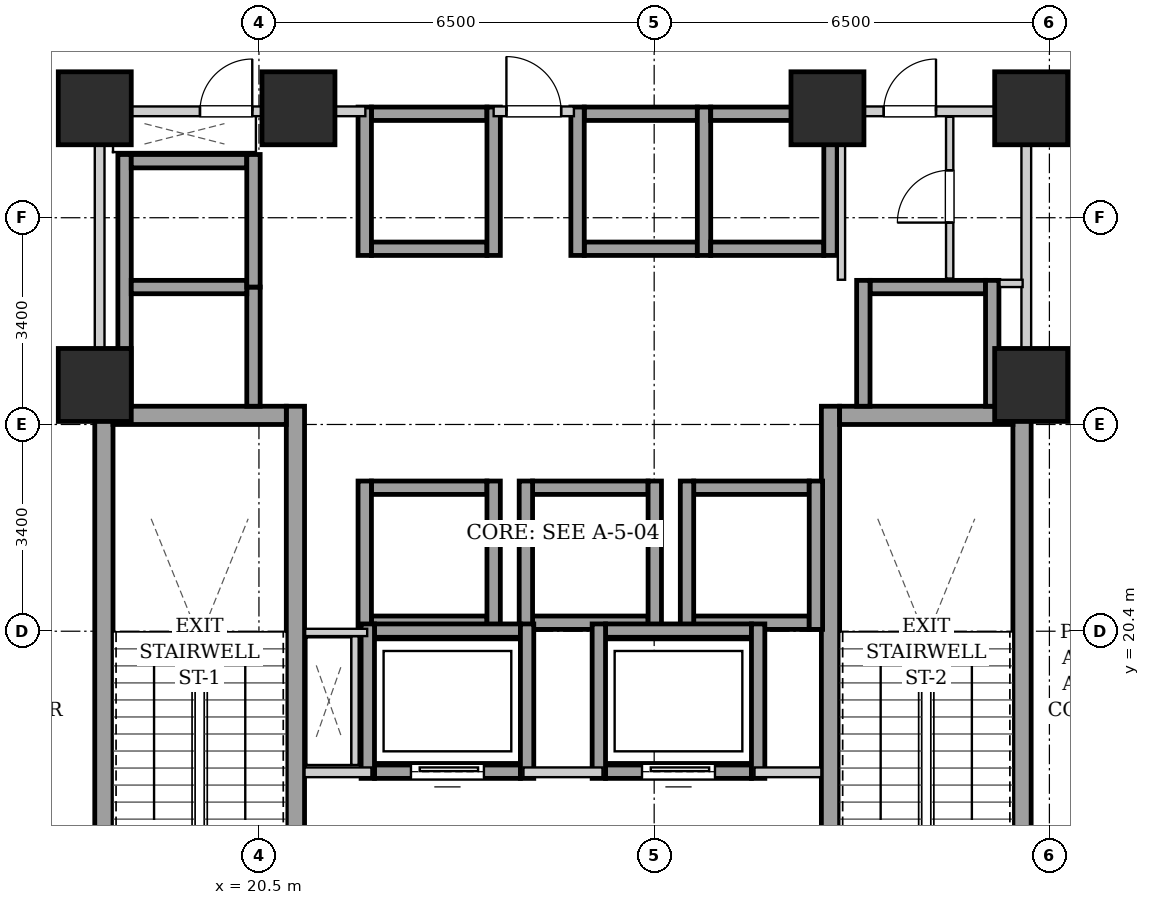
"""IFC4 building model, lengths in metres.
Left out: names, types, materials, properties, quantities, classifications, styles, units other than length and angle.
Written with IfcOpenShell. Run it as: python <this file> out.ifc"""

import sys

from ifc_helpers import new_model, si_unit, direction, frame, frame_2d, origin, origin_2d, place, context, subcontext, project, spatial, rectangle, extrude, element, fill, save


model = new_model("IFC4")
c1 = context("Model", 3, precision=1e-05, world=origin(), true_north=direction((0.0, 1.0)))
c2 = subcontext(c1, "Body", "Model", "MODEL_VIEW")
j1 = project(units=[si_unit("LENGTHUNIT", "METRE"), si_unit("PLANEANGLEUNIT", "RADIAN")], contexts=[c1])
p1 = place(None, origin())
s1 = spatial("IfcSite", under=j1, at=p1, CompositionType="ELEMENT")
p2 = place(p1, origin())
s2 = spatial("IfcBuilding", under=s1, at=p2, CompositionType="ELEMENT")
p3 = place(p2, frame((0.0, 0.0, 11.2)))
s3 = spatial("IfcBuildingStorey", under=s2, at=p3, CompositionType="ELEMENT", Elevation=11.2)
for number, where, z_axis, x_axis in (
    (1, (17.8, 29.0, 0.0), (0.0, 0.0, 1.0), (1.0, 0.0, 0.0)),
    (2, (21.15, 29.0, 0.0), (0.0, 0.0, 1.0), (1.0, 0.0, 0.0)),
    (3, (29.85, 29.0, 0.0), (0.0, 0.0, 1.0), (1.0, 0.0, 0.0)),
    (4, (33.2, 29.0, 0.0), (0.0, 0.0, 1.0), (1.0, 0.0, 0.0)),
    (5, (17.8, 24.45, 0.0), (0.0, 0.0, 1.0), (1.0, 0.0, 0.0)),
    (6, (33.2, 24.45, 0.0), (0.0, 0.0, 1.0), (1.0, 0.0, 0.0)),
):
    element("IfcColumn", number, at=place(p3, frame(where, z_axis=z_axis, x_axis=x_axis)), inside=s3, PredefinedType="COLUMN", context=c2, shape_type="SweptSolid", body=[
        extrude(rectangle(XDim=1.2, YDim=1.2, at=origin_2d()), origin(), (0.0, 0.0, 1.0), 4.8),
    ])
for number, where, z_axis, x_axis in (
    (7, (17.95, 15.1, 0.0), (0.0, 0.0, 1.0), (0.0, 1.0, 0.0)),
    (8, (21.1, 15.1, 0.0), (0.0, 0.0, 1.0), (0.0, 1.0, 0.0)),
):
    element("IfcWall", number, at=place(p3, frame(where, z_axis=z_axis, x_axis=x_axis)), inside=s3, PredefinedType="SHEAR", context=c2, shape_type="SweptSolid", body=[
        extrude(rectangle(XDim=9.0, YDim=0.3, at=frame_2d((4.5, 0.0))), origin(), (0.0, 0.0, 1.0), 4.48),
    ])
p4 = place(p3, frame((18.1, 23.95, 0.0), z_axis=(0.0, 0.0, 1.0), x_axis=(1.0, 0.0, 0.0)))
e9 = element("IfcWall", 9, at=p4, inside=s3, PredefinedType="SHEAR", context=c2, shape_type="SweptSolid", body=[
    extrude(rectangle(XDim=2.85, YDim=0.3, at=frame_2d((1.425, 0.0))), origin(), (0.0, 0.0, 1.0), 4.48),
])
for number, where, z_axis, x_axis in (
    (10, (29.9, 15.1, 0.0), (0.0, 0.0, 1.0), (0.0, 1.0, 0.0)),
    (11, (33.05, 15.1, 0.0), (0.0, 0.0, 1.0), (0.0, 1.0, 0.0)),
):
    element("IfcWall", number, at=place(p3, frame(where, z_axis=z_axis, x_axis=x_axis)), inside=s3, PredefinedType="SHEAR", context=c2, shape_type="SweptSolid", body=[
        extrude(rectangle(XDim=9.0, YDim=0.3, at=frame_2d((4.5, 0.0))), origin(), (0.0, 0.0, 1.0), 4.48),
    ])
p5 = place(p3, frame((30.05, 23.95, 0.0), z_axis=(0.0, 0.0, 1.0), x_axis=(1.0, 0.0, 0.0)))
e12 = element("IfcWall", 12, at=p5, inside=s3, PredefinedType="SHEAR", context=c2, shape_type="SweptSolid", body=[
    extrude(rectangle(XDim=2.85, YDim=0.3, at=frame_2d((1.425, 0.0))), origin(), (0.0, 0.0, 1.0), 4.48),
])
for number, where, z_axis, x_axis in (
    (13, (22.35, 26.69, 0.0), (0.0, 0.0, 1.0), (1.0, 0.0, 0.0)),
    (14, (22.35, 28.91, 0.0), (0.0, 0.0, 1.0), (1.0, 0.0, 0.0)),
):
    element("IfcWall", number, at=place(p3, frame(where, z_axis=z_axis, x_axis=x_axis)), inside=s3, PredefinedType="SHEAR", context=c2, shape_type="SweptSolid", body=[
        extrude(rectangle(XDim=1.9, YDim=0.22, at=frame_2d((0.95, 0.0))), origin(), (0.0, 0.0, 1.0), 4.48),
    ])
for number, where, z_axis, x_axis in (
    (15, (22.24, 26.58, 0.0), (0.0, 0.0, 1.0), (0.0, 1.0, 0.0)),
    (16, (24.36, 26.58, 0.0), (0.0, 0.0, 1.0), (0.0, 1.0, 0.0)),
):
    element("IfcWall", number, at=place(p3, frame(where, z_axis=z_axis, x_axis=x_axis)), inside=s3, PredefinedType="SHEAR", context=c2, shape_type="SweptSolid", body=[
        extrude(rectangle(XDim=2.44, YDim=0.22, at=frame_2d((1.22, 0.0))), origin(), (0.0, 0.0, 1.0), 4.48),
    ])
for number, where, z_axis, x_axis in (
    (17, (25.85, 26.69, 0.0), (0.0, 0.0, 1.0), (1.0, 0.0, 0.0)),
    (18, (25.85, 28.91, 0.0), (0.0, 0.0, 1.0), (1.0, 0.0, 0.0)),
):
    element("IfcWall", number, at=place(p3, frame(where, z_axis=z_axis, x_axis=x_axis)), inside=s3, PredefinedType="SHEAR", context=c2, shape_type="SweptSolid", body=[
        extrude(rectangle(XDim=1.86, YDim=0.22, at=frame_2d((0.93, 0.0))), origin(), (0.0, 0.0, 1.0), 4.48),
    ])
for number, where, z_axis, x_axis in (
    (19, (25.74, 26.58, 0.0), (0.0, 0.0, 1.0), (0.0, 1.0, 0.0)),
    (20, (27.82, 26.58, 0.0), (0.0, 0.0, 1.0), (0.0, 1.0, 0.0)),
):
    element("IfcWall", number, at=place(p3, frame(where, z_axis=z_axis, x_axis=x_axis)), inside=s3, PredefinedType="SHEAR", context=c2, shape_type="SweptSolid", body=[
        extrude(rectangle(XDim=2.44, YDim=0.22, at=frame_2d((1.22, 0.0))), origin(), (0.0, 0.0, 1.0), 4.48),
    ])
for number, where, z_axis, x_axis in (
    (21, (27.93, 26.69, 0.0), (0.0, 0.0, 1.0), (1.0, 0.0, 0.0)),
    (22, (27.93, 28.91, 0.0), (0.0, 0.0, 1.0), (1.0, 0.0, 0.0)),
):
    element("IfcWall", number, at=place(p3, frame(where, z_axis=z_axis, x_axis=x_axis)), inside=s3, PredefinedType="SHEAR", context=c2, shape_type="SweptSolid", body=[
        extrude(rectangle(XDim=1.86, YDim=0.22, at=frame_2d((0.93, 0.0))), origin(), (0.0, 0.0, 1.0), 4.48),
    ])
p6 = place(p3, frame((29.9, 26.58, 0.0), z_axis=(0.0, 0.0, 1.0), x_axis=(0.0, 1.0, 0.0)))
e23 = element("IfcWall", 23, at=p6, inside=s3, PredefinedType="SHEAR", context=c2, shape_type="SweptSolid", body=[
    extrude(rectangle(XDim=2.44, YDim=0.22, at=frame_2d((1.22, 0.0))), origin(), (0.0, 0.0, 1.0), 4.48),
])
for number, where, z_axis, x_axis in (
    (24, (22.35, 20.54, 0.0), (0.0, 0.0, 1.0), (1.0, 0.0, 0.0)),
    (25, (22.35, 22.76, 0.0), (0.0, 0.0, 1.0), (1.0, 0.0, 0.0)),
):
    element("IfcWall", number, at=place(p3, frame(where, z_axis=z_axis, x_axis=x_axis)), inside=s3, PredefinedType="SHEAR", context=c2, shape_type="SweptSolid", body=[
        extrude(rectangle(XDim=1.9, YDim=0.22, at=frame_2d((0.95, 0.0))), origin(), (0.0, 0.0, 1.0), 4.48),
    ])
for number, where, z_axis, x_axis in (
    (26, (22.24, 20.43, 0.0), (0.0, 0.0, 1.0), (0.0, 1.0, 0.0)),
    (27, (24.36, 20.43, 0.0), (0.0, 0.0, 1.0), (0.0, 1.0, 0.0)),
):
    element("IfcWall", number, at=place(p3, frame(where, z_axis=z_axis, x_axis=x_axis)), inside=s3, PredefinedType="SHEAR", context=c2, shape_type="SweptSolid", body=[
        extrude(rectangle(XDim=2.44, YDim=0.22, at=frame_2d((1.22, 0.0))), origin(), (0.0, 0.0, 1.0), 4.48),
    ])
for number, where, z_axis, x_axis in (
    (28, (25.0, 20.54, 0.0), (0.0, 0.0, 1.0), (1.0, 0.0, 0.0)),
    (29, (25.0, 22.76, 0.0), (0.0, 0.0, 1.0), (1.0, 0.0, 0.0)),
):
    element("IfcWall", number, at=place(p3, frame(where, z_axis=z_axis, x_axis=x_axis)), inside=s3, PredefinedType="SHEAR", context=c2, shape_type="SweptSolid", body=[
        extrude(rectangle(XDim=1.9, YDim=0.22, at=frame_2d((0.95, 0.0))), origin(), (0.0, 0.0, 1.0), 4.48),
    ])
for number, where, z_axis, x_axis in (
    (30, (24.89, 20.43, 0.0), (0.0, 0.0, 1.0), (0.0, 1.0, 0.0)),
    (31, (27.01, 20.43, 0.0), (0.0, 0.0, 1.0), (0.0, 1.0, 0.0)),
):
    element("IfcWall", number, at=place(p3, frame(where, z_axis=z_axis, x_axis=x_axis)), inside=s3, PredefinedType="SHEAR", context=c2, shape_type="SweptSolid", body=[
        extrude(rectangle(XDim=2.44, YDim=0.22, at=frame_2d((1.22, 0.0))), origin(), (0.0, 0.0, 1.0), 4.48),
    ])
for number, where, z_axis, x_axis in (
    (32, (27.65, 20.54, 0.0), (0.0, 0.0, 1.0), (1.0, 0.0, 0.0)),
    (33, (27.65, 22.76, 0.0), (0.0, 0.0, 1.0), (1.0, 0.0, 0.0)),
):
    element("IfcWall", number, at=place(p3, frame(where, z_axis=z_axis, x_axis=x_axis)), inside=s3, PredefinedType="SHEAR", context=c2, shape_type="SweptSolid", body=[
        extrude(rectangle(XDim=1.9, YDim=0.22, at=frame_2d((0.95, 0.0))), origin(), (0.0, 0.0, 1.0), 4.48),
    ])
for number, where, z_axis, x_axis in (
    (34, (27.54, 20.43, 0.0), (0.0, 0.0, 1.0), (0.0, 1.0, 0.0)),
    (35, (29.66, 20.43, 0.0), (0.0, 0.0, 1.0), (0.0, 1.0, 0.0)),
):
    element("IfcWall", number, at=place(p3, frame(where, z_axis=z_axis, x_axis=x_axis)), inside=s3, PredefinedType="SHEAR", context=c2, shape_type="SweptSolid", body=[
        extrude(rectangle(XDim=2.44, YDim=0.22, at=frame_2d((1.22, 0.0))), origin(), (0.0, 0.0, 1.0), 4.48),
    ])
p7 = place(p3, frame((18.29, 24.1, 0.0), z_axis=(0.0, 0.0, 1.0), x_axis=(0.0, 1.0, 0.0)))
e36 = element("IfcWall", 36, at=p7, inside=s3, PredefinedType="SHEAR", context=c2, shape_type="SweptSolid", body=[
    extrude(rectangle(XDim=4.14, YDim=0.22, at=frame_2d((2.07, 0.0))), origin(), (0.0, 0.0, 1.0), 4.48),
])
p8 = place(p3, frame((20.41, 24.1, 0.0), z_axis=(0.0, 0.0, 1.0), x_axis=(0.0, 1.0, 0.0)))
e37 = element("IfcWall", 37, at=p8, inside=s3, PredefinedType="SHEAR", context=c2, shape_type="SweptSolid", body=[
    extrude(rectangle(XDim=1.96, YDim=0.22, at=frame_2d((0.98, 0.0))), origin(), (0.0, 0.0, 1.0), 4.48),
])
for number, where, z_axis, x_axis in (
    (38, (18.4, 26.06, 0.0), (0.0, 0.0, 1.0), (1.0, 0.0, 0.0)),
    (39, (18.4, 28.13, 0.0), (0.0, 0.0, 1.0), (1.0, 0.0, 0.0)),
):
    element("IfcWall", number, at=place(p3, frame(where, z_axis=z_axis, x_axis=x_axis)), inside=s3, PredefinedType="SHEAR", context=c2, shape_type="SweptSolid", body=[
        extrude(rectangle(XDim=1.9, YDim=0.22, at=frame_2d((0.95, 0.0))), origin(), (0.0, 0.0, 1.0), 4.48),
    ])
p9 = place(p3, frame((20.41, 26.06, 0.0), z_axis=(0.0, 0.0, 1.0), x_axis=(0.0, 1.0, 0.0)))
e40 = element("IfcWall", 40, at=p9, inside=s3, PredefinedType="SHEAR", context=c2, shape_type="SweptSolid", body=[
    extrude(rectangle(XDim=2.18, YDim=0.22, at=frame_2d((1.09, 0.0))), origin(), (0.0, 0.0, 1.0), 4.48),
])
p10 = place(p3, frame((30.55, 26.06, 0.0), z_axis=(0.0, 0.0, 1.0), x_axis=(1.0, 0.0, 0.0)))
e41 = element("IfcWall", 41, at=p10, inside=s3, PredefinedType="SHEAR", context=c2, shape_type="SweptSolid", body=[
    extrude(rectangle(XDim=1.9, YDim=0.22, at=frame_2d((0.95, 0.0))), origin(), (0.0, 0.0, 1.0), 4.48),
])
for number, where, z_axis, x_axis in (
    (42, (30.44, 24.1, 0.0), (0.0, 0.0, 1.0), (0.0, 1.0, 0.0)),
    (43, (32.56, 24.1, 0.0), (0.0, 0.0, 1.0), (0.0, 1.0, 0.0)),
):
    element("IfcWall", number, at=place(p3, frame(where, z_axis=z_axis, x_axis=x_axis)), inside=s3, PredefinedType="SHEAR", context=c2, shape_type="SweptSolid", body=[
        extrude(rectangle(XDim=2.07, YDim=0.22, at=frame_2d((1.035, 0.0))), origin(), (0.0, 0.0, 1.0), 4.48),
    ])
p11 = place(p3, frame((22.4, 18.09, 0.0), z_axis=(0.0, 0.0, 1.0), x_axis=(1.0, 0.0, 0.0)))
e44 = element("IfcWall", 44, at=p11, inside=s3, PredefinedType="SHEAR", context=c2, shape_type="SweptSolid", body=[
    extrude(rectangle(XDim=2.4, YDim=0.22, at=frame_2d((1.2, 0.0))), origin(), (0.0, 0.0, 1.0), 4.48),
])
p12 = place(p11, frame((0.6, 0.0, 0.0)))
e45 = element("IfcOpeningElement", 45, at=p12, cuts=e44, PredefinedType="OPENING", context=c2, shape_type="SweptSolid", body=[
    extrude(rectangle(XDim=1.2, YDim=2.15, at=frame_2d((0.6, 1.075))), frame((0.0, 0.12, 0.0), z_axis=(0.0, -1.0, 0.0), x_axis=(1.0, 0.0, 0.0)), (0.0, 0.0, 1.0), 0.24),
])
p13 = place(p3, frame((22.4, 20.41, 0.0), z_axis=(0.0, 0.0, 1.0), x_axis=(1.0, 0.0, 0.0)))
e46 = element("IfcWall", 46, at=p13, inside=s3, PredefinedType="SHEAR", context=c2, shape_type="SweptSolid", body=[
    extrude(rectangle(XDim=2.4, YDim=0.22, at=frame_2d((1.2, 0.0))), origin(), (0.0, 0.0, 1.0), 4.48),
])
for number, where, z_axis, x_axis in (
    (47, (22.29, 17.98, 0.0), (0.0, 0.0, 1.0), (0.0, 1.0, 0.0)),
    (48, (24.91, 17.98, 0.0), (0.0, 0.0, 1.0), (0.0, 1.0, 0.0)),
):
    element("IfcWall", number, at=place(p3, frame(where, z_axis=z_axis, x_axis=x_axis)), inside=s3, PredefinedType="SHEAR", context=c2, shape_type="SweptSolid", body=[
        extrude(rectangle(XDim=2.54, YDim=0.22, at=frame_2d((1.27, 0.0))), origin(), (0.0, 0.0, 1.0), 4.48),
    ])
p14 = place(p3, frame((26.2, 18.09, 0.0), z_axis=(0.0, 0.0, 1.0), x_axis=(1.0, 0.0, 0.0)))
e49 = element("IfcWall", 49, at=p14, inside=s3, PredefinedType="SHEAR", context=c2, shape_type="SweptSolid", body=[
    extrude(rectangle(XDim=2.4, YDim=0.22, at=frame_2d((1.2, 0.0))), origin(), (0.0, 0.0, 1.0), 4.48),
])
p15 = place(p14, frame((0.6, 0.0, 0.0)))
e50 = element("IfcOpeningElement", 50, at=p15, cuts=e49, PredefinedType="OPENING", context=c2, shape_type="SweptSolid", body=[
    extrude(rectangle(XDim=1.2, YDim=2.15, at=frame_2d((0.6, 1.075))), frame((0.0, 0.12, 0.0), z_axis=(0.0, -1.0, 0.0), x_axis=(1.0, 0.0, 0.0)), (0.0, 0.0, 1.0), 0.24),
])
p16 = place(p3, frame((26.2, 20.41, 0.0), z_axis=(0.0, 0.0, 1.0), x_axis=(1.0, 0.0, 0.0)))
e51 = element("IfcWall", 51, at=p16, inside=s3, PredefinedType="SHEAR", context=c2, shape_type="SweptSolid", body=[
    extrude(rectangle(XDim=2.4, YDim=0.22, at=frame_2d((1.2, 0.0))), origin(), (0.0, 0.0, 1.0), 4.48),
])
for number, where, z_axis, x_axis in (
    (52, (26.09, 17.98, 0.0), (0.0, 0.0, 1.0), (0.0, 1.0, 0.0)),
    (53, (28.71, 17.98, 0.0), (0.0, 0.0, 1.0), (0.0, 1.0, 0.0)),
):
    element("IfcWall", number, at=place(p3, frame(where, z_axis=z_axis, x_axis=x_axis)), inside=s3, PredefinedType="SHEAR", context=c2, shape_type="SweptSolid", body=[
        extrude(rectangle(XDim=2.54, YDim=0.22, at=frame_2d((1.27, 0.0))), origin(), (0.0, 0.0, 1.0), 4.48),
    ])
p17 = place(p3, frame((21.25, 18.08, 0.0), z_axis=(0.0, 0.0, 1.0), x_axis=(1.0, 0.0, 0.0)))
e54 = element("IfcWall", 54, at=p17, inside=s3, PredefinedType="PARTITIONING", context=c2, shape_type="SweptSolid", body=[
    extrude(rectangle(XDim=1.1, YDim=0.16, at=frame_2d((0.55, 0.0))), origin(), (0.0, 0.0, 1.0), 4.48),
])
p18 = place(p3, frame((24.85, 18.08, 0.0), z_axis=(0.0, 0.0, 1.0), x_axis=(1.0, 0.0, 0.0)))
e55 = element("IfcWall", 55, at=p18, inside=s3, PredefinedType="PARTITIONING", context=c2, shape_type="SweptSolid", body=[
    extrude(rectangle(XDim=1.3, YDim=0.16, at=frame_2d((0.65, 0.0))), origin(), (0.0, 0.0, 1.0), 4.48),
])
p19 = place(p3, frame((28.65, 18.08, 0.0), z_axis=(0.0, 0.0, 1.0), x_axis=(1.0, 0.0, 0.0)))
e56 = element("IfcWall", 56, at=p19, inside=s3, PredefinedType="PARTITIONING", context=c2, shape_type="SweptSolid", body=[
    extrude(rectangle(XDim=1.1, YDim=0.16, at=frame_2d((0.55, 0.0))), origin(), (0.0, 0.0, 1.0), 4.48),
])
for number, where, z_axis, x_axis in (
    (57, (17.88, 24.12, 0.0), (0.0, 0.0, 1.0), (0.0, 1.0, 0.0)),
    (58, (33.12, 24.12, 0.0), (0.0, 0.0, 1.0), (0.0, 1.0, 0.0)),
):
    element("IfcWall", number, at=place(p3, frame(where, z_axis=z_axis, x_axis=x_axis)), inside=s3, PredefinedType="PARTITIONING", context=c2, shape_type="SweptSolid", body=[
        extrude(rectangle(XDim=4.76, YDim=0.16, at=frame_2d((2.38, 0.0))), origin(), (0.0, 0.0, 1.0), 4.48),
    ])
p20 = place(p3, frame((24.36, 28.95, 0.0), z_axis=(0.0, 0.0, 1.0), x_axis=(1.0, 0.0, 0.0)))
e59 = element("IfcWall", 59, at=p20, inside=s3, PredefinedType="PARTITIONING", context=c2, shape_type="SweptSolid", body=[
    extrude(rectangle(XDim=1.32, YDim=0.16, at=frame_2d((0.66, 0.0))), origin(), (0.0, 0.0, 1.0), 4.48),
])
p21 = place(p20, frame((0.21, 0.0, 0.0)))
e60 = element("IfcOpeningElement", 60, at=p21, cuts=e59, PredefinedType="OPENING", context=c2, shape_type="SweptSolid", body=[
    extrude(rectangle(XDim=0.9, YDim=2.05, at=frame_2d((0.45, 1.025))), frame((0.0, 0.09, 0.0), z_axis=(0.0, -1.0, 0.0), x_axis=(1.0, 0.0, 0.0)), (0.0, 0.0, 1.0), 0.18),
])
p22 = place(p3, frame((17.96, 28.95, 0.0), z_axis=(0.0, 0.0, 1.0), x_axis=(1.0, 0.0, 0.0)))
e61 = element("IfcWall", 61, at=p22, inside=s3, PredefinedType="PARTITIONING", context=c2, shape_type="SweptSolid", body=[
    extrude(rectangle(XDim=4.29, YDim=0.16, at=frame_2d((2.145, 0.0))), origin(), (0.0, 0.0, 1.0), 4.48),
])
p23 = place(p22, frame((1.57, 0.0, 0.0)))
e62 = element("IfcOpeningElement", 62, at=p23, cuts=e61, PredefinedType="OPENING", context=c2, shape_type="SweptSolid", body=[
    extrude(rectangle(XDim=0.86, YDim=2.05, at=frame_2d((0.43, 1.025))), frame((0.0, 0.09, 0.0), z_axis=(0.0, -1.0, 0.0), x_axis=(1.0, 0.0, 0.0)), (0.0, 0.0, 1.0), 0.18),
])
p24 = place(p3, frame((22.08, 18.2, 0.0), z_axis=(0.0, 0.0, 1.0), x_axis=(0.0, 1.0, 0.0)))
e63 = element("IfcWall", 63, at=p24, inside=s3, PredefinedType="PARTITIONING", context=c2, shape_type="SweptSolid", body=[
    extrude(rectangle(XDim=2.12, YDim=0.12, at=frame_2d((1.06, 0.0))), origin(), (0.0, 0.0, 1.0), 4.48),
])
p25 = place(p3, frame((22.28, 20.38, 0.0), z_axis=(0.0, 0.0, 1.0), x_axis=(-1.0, 0.0, 0.0)))
e64 = element("IfcWall", 64, at=p25, inside=s3, PredefinedType="PARTITIONING", context=c2, shape_type="SweptSolid", body=[
    extrude(rectangle(XDim=1.02, YDim=0.12, at=frame_2d((0.51, 0.0))), origin(), (0.0, 0.0, 1.0), 4.48),
])
p26 = place(p3, frame((30.08, 26.18, 0.0), z_axis=(0.0, 0.0, 1.0), x_axis=(0.0, 1.0, 0.0)))
e65 = element("IfcWall", 65, at=p26, inside=s3, PredefinedType="PARTITIONING", context=c2, shape_type="SweptSolid", body=[
    extrude(rectangle(XDim=2.68, YDim=0.12, at=frame_2d((1.34, 0.0))), origin(), (0.0, 0.0, 1.0), 4.48),
])
p27 = place(p3, frame((32.68, 26.12, 0.0), z_axis=(0.0, 0.0, 1.0), x_axis=(1.0, 0.0, 0.0)))
e66 = element("IfcWall", 66, at=p27, inside=s3, PredefinedType="PARTITIONING", context=c2, shape_type="SweptSolid", body=[
    extrude(rectangle(XDim=0.38, YDim=0.12, at=frame_2d((0.19, 0.0))), origin(), (0.0, 0.0, 1.0), 4.48),
])
p28 = place(p3, frame((31.86, 26.2, 0.0), z_axis=(0.0, 0.0, 1.0), x_axis=(0.0, 1.0, 0.0)))
e67 = element("IfcWall", 67, at=p28, inside=s3, PredefinedType="PARTITIONING", context=c2, shape_type="SweptSolid", body=[
    extrude(rectangle(XDim=2.66, YDim=0.12, at=frame_2d((1.33, 0.0))), origin(), (0.0, 0.0, 1.0), 4.48),
])
p29 = place(p28, frame((0.92, 0.0, 0.0)))
e68 = element("IfcOpeningElement", 68, at=p29, cuts=e67, PredefinedType="OPENING", context=c2, shape_type="SweptSolid", body=[
    extrude(rectangle(XDim=0.86, YDim=2.05, at=frame_2d((0.43, 1.025))), frame((0.0, 0.07, 0.0), z_axis=(0.0, -1.0, 0.0), x_axis=(1.0, 0.0, 0.0)), (0.0, 0.0, 1.0), 0.14),
])
p30 = place(p3, frame((30.08, 28.95, 0.0), z_axis=(0.0, 0.0, 1.0), x_axis=(1.0, 0.0, 0.0)))
e69 = element("IfcWall", 69, at=p30, inside=s3, PredefinedType="PARTITIONING", context=c2, shape_type="SweptSolid", body=[
    extrude(rectangle(XDim=2.96, YDim=0.16, at=frame_2d((1.48, 0.0))), origin(), (0.0, 0.0, 1.0), 4.48),
])
p31 = place(p30, frame((0.695, 0.0, 0.0)))
e70 = element("IfcOpeningElement", 70, at=p31, cuts=e69, PredefinedType="OPENING", context=c2, shape_type="SweptSolid", body=[
    extrude(rectangle(XDim=0.86, YDim=2.05, at=frame_2d((0.43, 1.025))), frame((0.0, 0.09, 0.0), z_axis=(0.0, -1.0, 0.0), x_axis=(1.0, 0.0, 0.0)), (0.0, 0.0, 1.0), 0.18),
])
p32 = place(p12, origin())
e71 = element("IfcDoor", 71, at=p32, inside=s3, OperationType="SLIDING_TO_LEFT", PredefinedType="DOOR", context=c2, shape_type="SweptSolid", body=[
    extrude(rectangle(XDim=1.2, YDim=2.15, at=frame_2d((0.6, 1.075))), frame((0.0, 0.025, 0.0), z_axis=(0.0, -1.0, 0.0), x_axis=(1.0, 0.0, 0.0)), (0.0, 0.0, 1.0), 0.05),
])
fill(e45, e71)
p33 = place(p15, origin())
e72 = element("IfcDoor", 72, at=p33, inside=s3, OperationType="SLIDING_TO_LEFT", PredefinedType="DOOR", context=c2, shape_type="SweptSolid", body=[
    extrude(rectangle(XDim=1.2, YDim=2.15, at=frame_2d((0.6, 1.075))), frame((0.0, 0.025, 0.0), z_axis=(0.0, -1.0, 0.0), x_axis=(1.0, 0.0, 0.0)), (0.0, 0.0, 1.0), 0.05),
])
fill(e50, e72)
p34 = place(p21, origin())
e73 = element("IfcDoor", 73, at=p34, inside=s3, OperationType="SINGLE_SWING_LEFT", PredefinedType="DOOR", context=c2, shape_type="SweptSolid", body=[
    extrude(rectangle(XDim=0.9, YDim=2.05, at=frame_2d((0.45, 1.025))), frame((0.0, 0.025, 0.0), z_axis=(0.0, -1.0, 0.0), x_axis=(1.0, 0.0, 0.0)), (0.0, 0.0, 1.0), 0.05),
])
fill(e60, e73)
p35 = place(p23, origin())
e74 = element("IfcDoor", 74, at=p35, inside=s3, OperationType="SINGLE_SWING_RIGHT", PredefinedType="DOOR", context=c2, shape_type="SweptSolid", body=[
    extrude(rectangle(XDim=0.86, YDim=2.05, at=frame_2d((0.43, 1.025))), frame((0.0, 0.025, 0.0), z_axis=(0.0, -1.0, 0.0), x_axis=(1.0, 0.0, 0.0)), (0.0, 0.0, 1.0), 0.05),
])
fill(e62, e74)
p36 = place(p29, origin())
e75 = element("IfcDoor", 75, at=p36, inside=s3, OperationType="SINGLE_SWING_LEFT", PredefinedType="DOOR", context=c2, shape_type="SweptSolid", body=[
    extrude(rectangle(XDim=0.86, YDim=2.05, at=frame_2d((0.43, 1.025))), frame((0.0, 0.025, 0.0), z_axis=(0.0, -1.0, 0.0), x_axis=(1.0, 0.0, 0.0)), (0.0, 0.0, 1.0), 0.05),
])
fill(e68, e75)
p37 = place(p31, origin())
e76 = element("IfcDoor", 76, at=p37, inside=s3, OperationType="SINGLE_SWING_RIGHT", PredefinedType="DOOR", context=c2, shape_type="SweptSolid", body=[
    extrude(rectangle(XDim=0.86, YDim=2.05, at=frame_2d((0.43, 1.025))), frame((0.0, 0.025, 0.0), z_axis=(0.0, -1.0, 0.0), x_axis=(1.0, 0.0, 0.0)), (0.0, 0.0, 1.0), 0.05),
])
fill(e70, e76)
save(model, sys.argv[1])
